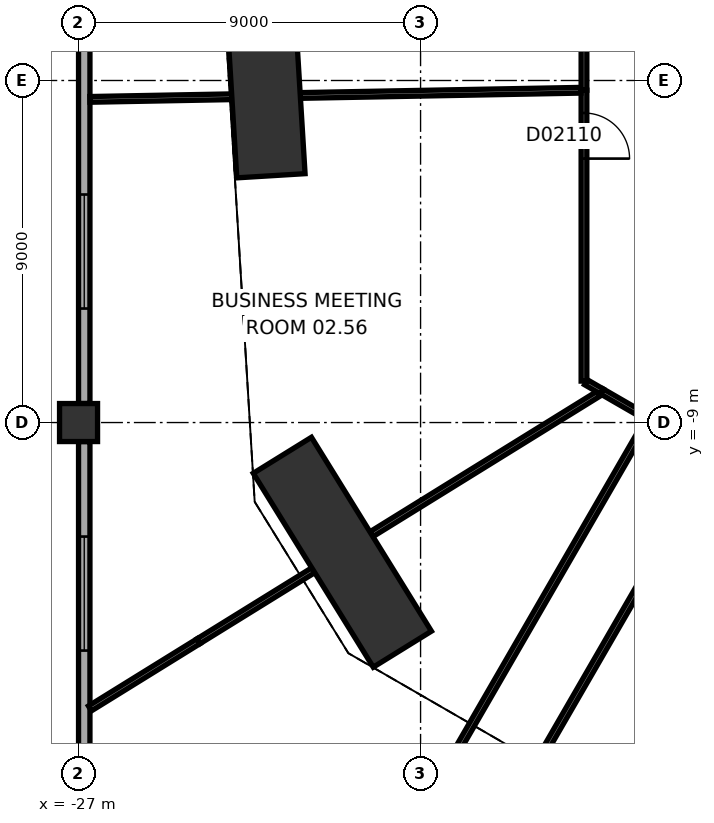
"""IFC4 building model, lengths in metres.
Left out: names, types, materials, properties, quantities, classifications, styles, units other than length and angle.
Written with IfcOpenShell. Run it as: python <this file> out.ifc"""

import sys

from ifc_helpers import new_model, si_unit, direction, frame, frame_2d, origin, origin_2d, place, context, subcontext, project, spatial, rectangle, extrude, element, fill, save


model = new_model("IFC4")
c1 = context("Model", 3, precision=1e-05, world=origin(), true_north=direction((0.0, 1.0)))
c2 = subcontext(c1, "Body", "Model", "MODEL_VIEW")
j1 = project(units=[si_unit("LENGTHUNIT", "METRE"), si_unit("PLANEANGLEUNIT", "RADIAN")], contexts=[c1])
p1 = place(None, origin())
s1 = spatial("IfcSite", under=j1, at=p1, CompositionType="ELEMENT")
p2 = place(p1, origin())
s2 = spatial("IfcBuilding", under=s1, at=p2, CompositionType="ELEMENT")
p3 = place(p2, frame((0.0, 0.0, 13.0)))
s3 = spatial("IfcBuildingStorey", under=s2, at=p3, CompositionType="ELEMENT", Elevation=13.0)
p4 = place(p3, frame((-22.066, -0.411, 0.0), z_axis=(0.0, 0.0, 1.0), x_axis=(0.061046797461, -0.99813490497, 0.0)))
e1 = element("IfcColumn", 1, at=p4, inside=s3, PredefinedType="COLUMN", context=c2, shape_type="SweptSolid", body=[
    extrude(rectangle(XDim=4.2, YDim=1.8, at=origin_2d()), origin(), (0.0, 0.0, 1.0), 8.0),
])
p5 = place(p3, frame((-20.058, -12.413, 0.0), z_axis=(0.0, 0.0, 1.0), x_axis=(0.526202050444, -0.850359572245, 0.0)))
e2 = element("IfcColumn", 2, at=p5, inside=s3, PredefinedType="COLUMN", context=c2, shape_type="SweptSolid", body=[
    extrude(rectangle(XDim=6.0, YDim=1.8, at=origin_2d()), origin(), (0.0, 0.0, 1.0), 8.0),
])
p6 = place(p3, frame((-27.0, -9.0, 0.0), z_axis=(0.0, 0.0, 1.0), x_axis=(1.0, 0.0, 0.0)))
e3 = element("IfcColumn", 3, at=p6, inside=s3, PredefinedType="COLUMN", context=c2, shape_type="SweptSolid", body=[
    extrude(rectangle(XDim=1.0, YDim=1.0, at=origin_2d()), origin(), (0.0, 0.0, 1.0), 8.0),
])
p7 = place(p3, frame((-26.85, 8.5, 0.0), z_axis=(0.0, 0.0, 1.0), x_axis=(0.0, -1.0, 0.0)))
e4 = element("IfcWall", 4, at=p7, inside=s3, PredefinedType="STANDARD", context=c2, shape_type="SweptSolid", body=[
    extrude(rectangle(XDim=17.0, YDim=0.3, at=frame_2d((8.5, 0.0))), origin(), (0.0, 0.0, 1.0), 6.5),
])
p8 = place(p7, frame((2.5, 0.0, 1.0)))
e5 = element("IfcOpeningElement", 5, at=p8, cuts=e4, PredefinedType="OPENING", context=c2, shape_type="SweptSolid", body=[
    extrude(rectangle(XDim=3.0, YDim=4.0, at=frame_2d((1.5, 2.0))), frame((0.0, 0.16, 0.0), z_axis=(0.0, -1.0, 0.0), x_axis=(1.0, 0.0, 0.0)), (0.0, 0.0, 1.0), 0.32),
])
p9 = place(p7, frame((11.5, 0.0, 1.0)))
e6 = element("IfcOpeningElement", 6, at=p9, cuts=e4, PredefinedType="OPENING", context=c2, shape_type="SweptSolid", body=[
    extrude(rectangle(XDim=3.0, YDim=4.0, at=frame_2d((1.5, 2.0))), frame((0.0, 0.16, 0.0), z_axis=(0.0, -1.0, 0.0), x_axis=(1.0, 0.0, 0.0)), (0.0, 0.0, 1.0), 0.32),
])
p10 = place(p3, frame((-26.85, -9.5, 0.0), z_axis=(0.0, 0.0, 1.0), x_axis=(0.0, -1.0, 0.0)))
e7 = element("IfcWall", 7, at=p10, inside=s3, PredefinedType="STANDARD", context=c2, shape_type="SweptSolid", body=[
    extrude(rectangle(XDim=17.0, YDim=0.3, at=frame_2d((8.5, 0.0))), origin(), (0.0, 0.0, 1.0), 6.5),
])
p11 = place(p10, frame((2.5, 0.0, 1.0)))
e8 = element("IfcOpeningElement", 8, at=p11, cuts=e7, PredefinedType="OPENING", context=c2, shape_type="SweptSolid", body=[
    extrude(rectangle(XDim=3.0, YDim=4.0, at=frame_2d((1.5, 2.0))), frame((0.0, 0.16, 0.0), z_axis=(0.0, -1.0, 0.0), x_axis=(1.0, 0.0, 0.0)), (0.0, 0.0, 1.0), 0.32),
])
p12 = place(p10, frame((12.75, 0.0, 1.0)))
e9 = element("IfcOpeningElement", 9, at=p12, cuts=e7, PredefinedType="OPENING", context=c2, shape_type="SweptSolid", body=[
    extrude(rectangle(XDim=3.0, YDim=4.0, at=frame_2d((1.5, 2.0))), frame((0.0, 0.16, 0.0), z_axis=(0.0, -1.0, 0.0), x_axis=(1.0, 0.0, 0.0)), (0.0, 0.0, 1.0), 0.32),
])
p13 = place(p3, frame((-18.021, -19.321, 0.0), z_axis=(0.0, 0.0, 1.0), x_axis=(0.500403049961, 0.865792577694, 0.0)))
e10 = element("IfcWall", 10, at=p13, inside=s3, PredefinedType="PARTITIONING", context=c2, shape_type="SweptSolid", body=[
    extrude(rectangle(XDim=11.963, YDim=0.15, at=frame_2d((5.982, 0.0))), origin(), (0.0, 0.0, 1.0), 7.7),
])
p14 = place(p13, frame((0.25, 0.0, 0.0)))
e11 = element("IfcOpeningElement", 11, at=p14, cuts=e10, PredefinedType="OPENING", context=c2, shape_type="SweptSolid", body=[
    extrude(rectangle(XDim=1.2, YDim=2.1, at=frame_2d((0.6, 1.05))), frame((0.0, 0.085, 0.0), z_axis=(0.0, -1.0, 0.0), x_axis=(1.0, 0.0, 0.0)), (0.0, 0.0, 1.0), 0.17),
])
p15 = place(p3, frame((-23.843, -14.754, 0.0), z_axis=(0.0, 0.0, 1.0), x_axis=(-0.850333278488, -0.526244539635, 0.0)))
e12 = element("IfcWall", 12, at=p15, inside=s3, PredefinedType="PARTITIONING", context=c2, shape_type="SweptSolid", body=[
    extrude(rectangle(XDim=3.36, YDim=0.15, at=frame_2d((1.68, 0.0))), origin(), (0.0, 0.0, 1.0), 7.7),
])
p16 = place(p3, frame((-23.843, -14.754, 0.0), z_axis=(0.0, 0.0, 1.0), x_axis=(0.850369165181, 0.526186547633, 0.0)))
e13 = element("IfcWall", 13, at=p16, inside=s3, PredefinedType="PARTITIONING", context=c2, shape_type="SweptSolid", body=[
    extrude(rectangle(XDim=3.551, YDim=0.15, at=frame_2d((1.775, 0.0))), origin(), (0.0, 0.0, 1.0), 7.7),
])
p17 = place(p3, frame((-19.293, -11.939, 0.0), z_axis=(0.0, 0.0, 1.0), x_axis=(0.85034374829, 0.526227621609, 0.0)))
e14 = element("IfcWall", 14, at=p17, inside=s3, PredefinedType="PARTITIONING", context=c2, shape_type="SweptSolid", body=[
    extrude(rectangle(XDim=7.016, YDim=0.15, at=frame_2d((3.508, 0.0))), origin(), (0.0, 0.0, 1.0), 7.7),
])
p18 = place(p3, frame((-10.303, -9.963, 0.0), z_axis=(0.0, 0.0, 1.0), x_axis=(-0.500409628778, -0.865788775295, 0.0)))
e15 = element("IfcWall", 15, at=p18, inside=s3, PredefinedType="PARTITIONING", context=c2, shape_type="SweptSolid", body=[
    extrude(rectangle(XDim=11.275, YDim=0.15, at=frame_2d((5.637, 0.0))), origin(), (0.0, 0.0, 1.0), 7.7),
])
p19 = place(p3, frame((-11.995, -8.894, 0.0), z_axis=(0.0, 0.0, 1.0), x_axis=(-0.866076810767, 0.499910949922, 0.0)))
e16 = element("IfcWall", 16, at=p19, inside=s3, PredefinedType="PARTITIONING", context=c2, shape_type="SweptSolid", body=[
    extrude(rectangle(XDim=1.42, YDim=0.15, at=frame_2d((0.71, 0.0))), origin(), (0.0, 0.0, 1.0), 7.7),
])
p20 = place(p3, frame((-13.648, -7.939, 0.0), z_axis=(0.0, 0.0, 1.0), x_axis=(0.865585916185, -0.500760443428, 0.0)))
e17 = element("IfcWall", 17, at=p20, inside=s3, PredefinedType="PARTITIONING", context=c2, shape_type="SweptSolid", body=[
    extrude(rectangle(XDim=0.489, YDim=0.15, at=frame_2d((0.244, 0.0))), origin(), (0.0, 0.0, 1.0), 7.7),
])
p21 = place(p3, frame((-13.7, -7.909, 0.0), z_axis=(0.0, 0.0, 1.0), x_axis=(0.0, 1.0, 0.0)))
e18 = element("IfcWall", 18, at=p21, inside=s3, PredefinedType="PARTITIONING", context=c2, shape_type="SweptSolid", body=[
    extrude(rectangle(XDim=7.655, YDim=0.15, at=frame_2d((3.827, 0.0))), origin(), (0.0, 0.0, 1.0), 7.7),
])
p22 = place(p21, frame((5.854, 0.0, 0.0)))
e19 = element("IfcOpeningElement", 19, at=p22, cuts=e18, PredefinedType="OPENING", context=c2, shape_type="SweptSolid", body=[
    extrude(rectangle(XDim=1.2, YDim=2.1, at=frame_2d((0.6, 1.05))), frame((0.0, 0.085, 0.0), z_axis=(0.0, -1.0, 0.0), x_axis=(1.0, 0.0, 0.0)), (0.0, 0.0, 1.0), 0.17),
])
p23 = place(p3, frame((-22.967, -0.427, 0.0), z_axis=(0.0, 0.0, 1.0), x_axis=(-0.999826372694, -0.018633959993, 0.0)))
e20 = element("IfcWall", 20, at=p23, inside=s3, PredefinedType="PARTITIONING", context=c2, shape_type="SweptSolid", body=[
    extrude(rectangle(XDim=3.734, YDim=0.15, at=frame_2d((1.867, 0.0))), origin(), (0.0, 0.0, 1.0), 7.7),
])
p24 = place(p3, frame((-13.78, -0.257, 0.0), z_axis=(0.0, 0.0, 1.0), x_axis=(-0.999826849708, -0.018608347649, 0.0)))
e21 = element("IfcWall", 21, at=p24, inside=s3, PredefinedType="PARTITIONING", context=c2, shape_type="SweptSolid", body=[
    extrude(rectangle(XDim=7.386, YDim=0.15, at=frame_2d((3.693, 0.0))), origin(), (0.0, 0.0, 1.0), 7.7),
])
p25 = place(p3, frame((-13.7, -0.255, 0.0), z_axis=(0.0, 0.0, 1.0), x_axis=(0.0, 1.0, 0.0)))
e22 = element("IfcWall", 22, at=p25, inside=s3, PredefinedType="PARTITIONING", context=c2, shape_type="SweptSolid", body=[
    extrude(rectangle(XDim=7.616, YDim=0.15, at=frame_2d((3.808, 0.0))), origin(), (0.0, 0.0, 1.0), 7.7),
])
p26 = place(p25, frame((5.866, 0.0, 0.0)))
e23 = element("IfcOpeningElement", 23, at=p26, cuts=e22, PredefinedType="OPENING", context=c2, shape_type="SweptSolid", body=[
    extrude(rectangle(XDim=1.2, YDim=2.1, at=frame_2d((0.6, 1.05))), frame((0.0, 0.085, 0.0), z_axis=(0.0, -1.0, 0.0), x_axis=(1.0, 0.0, 0.0)), (0.0, 0.0, 1.0), 0.17),
])
p27 = place(p9, origin())
e24 = element("IfcWindow", 24, at=p27, inside=s3, PartitioningType="SINGLE_PANEL", PredefinedType="WINDOW", context=c2, shape_type="SweptSolid", body=[
    extrude(rectangle(XDim=3.0, YDim=4.0, at=frame_2d((1.5, 2.0))), frame((0.0, 0.03, 0.0), z_axis=(0.0, -1.0, 0.0), x_axis=(1.0, 0.0, 0.0)), (0.0, 0.0, 1.0), 0.06),
])
fill(e6, e24)
p28 = place(p11, origin())
e25 = element("IfcWindow", 25, at=p28, inside=s3, PartitioningType="SINGLE_PANEL", PredefinedType="WINDOW", context=c2, shape_type="SweptSolid", body=[
    extrude(rectangle(XDim=3.0, YDim=4.0, at=frame_2d((1.5, 2.0))), frame((0.0, 0.03, 0.0), z_axis=(0.0, -1.0, 0.0), x_axis=(1.0, 0.0, 0.0)), (0.0, 0.0, 1.0), 0.06),
])
fill(e8, e25)
p29 = place(p22, origin())
e26 = element("IfcDoor", 26, at=p29, inside=s3, OperationType="SINGLE_SWING_LEFT", PredefinedType="DOOR", context=c2, shape_type="SweptSolid", body=[
    extrude(rectangle(XDim=1.2, YDim=2.1, at=frame_2d((0.6, 1.05))), frame((0.0, 0.025, 0.0), z_axis=(0.0, -1.0, 0.0), x_axis=(1.0, 0.0, 0.0)), (0.0, 0.0, 1.0), 0.05),
])
fill(e19, e26)
save(model, sys.argv[1])
